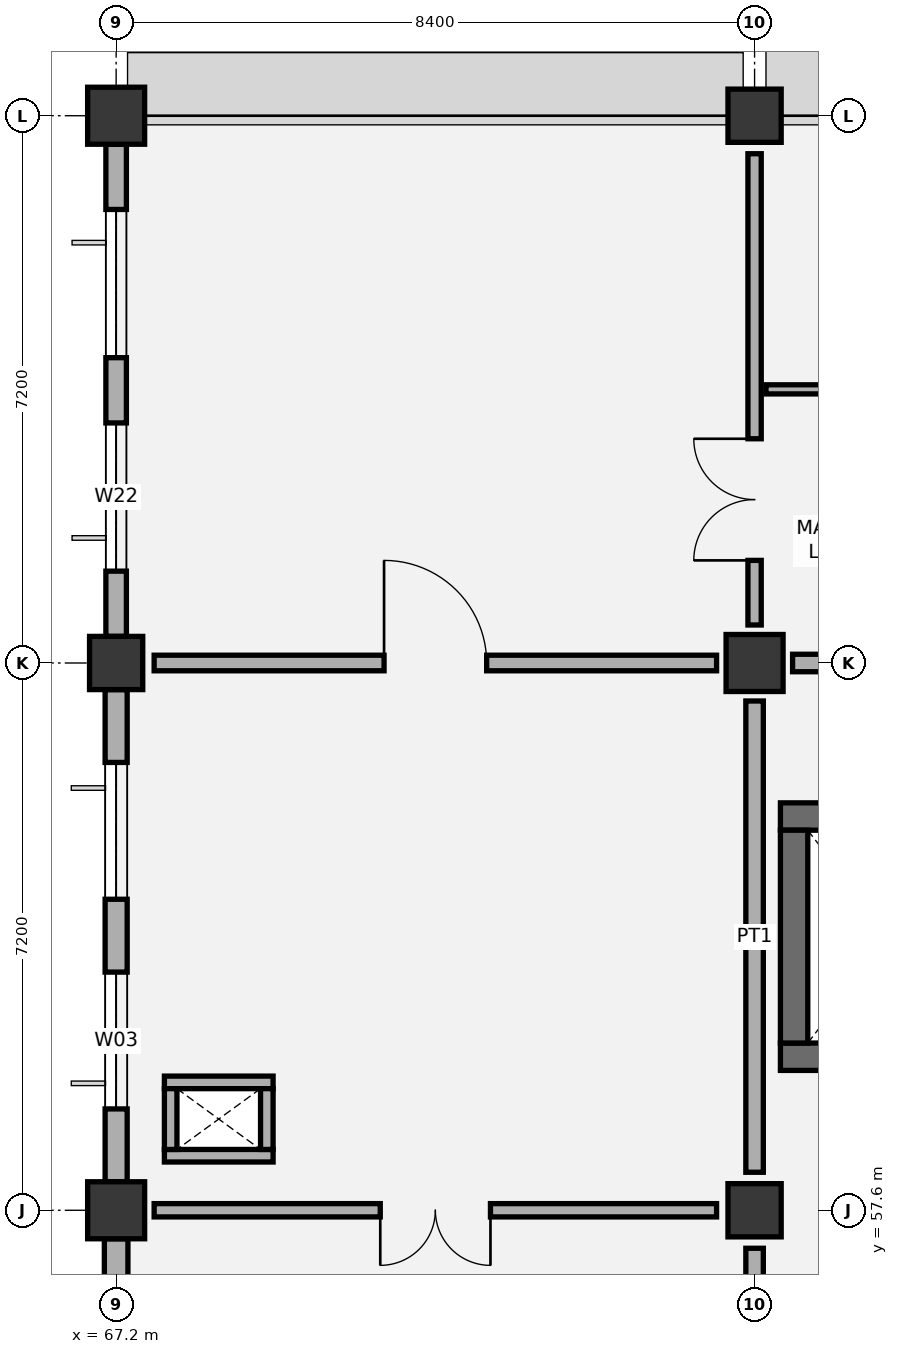
"""IFC4 building model, lengths in metres.
Left out: names, types, materials, properties, quantities, classifications, styles, units other than length and angle.
Written with IfcOpenShell. Run it as: python <this file> out.ifc"""

import sys

from ifc_helpers import new_model, si_unit, direction, frame, frame_2d, origin, origin_2d, place, context, subcontext, project, spatial, rectangle, extrude, element, fill, save


model = new_model("IFC4")
c1 = context("Model", 3, precision=1e-05, world=origin(), true_north=direction((0.0, 1.0)))
c2 = subcontext(c1, "Body", "Model", "MODEL_VIEW")
j1 = project(units=[si_unit("LENGTHUNIT", "METRE"), si_unit("PLANEANGLEUNIT", "RADIAN")], contexts=[c1])
p1 = place(None, origin())
s1 = spatial("IfcSite", under=j1, at=p1, CompositionType="ELEMENT")
p2 = place(p1, origin())
s2 = spatial("IfcBuilding", under=s1, at=p2, CompositionType="ELEMENT")
p3 = place(p2, frame((0.0, 0.0, 39.6)))
s3 = spatial("IfcBuildingStorey", under=s2, at=p3, CompositionType="ELEMENT", Elevation=39.6)
p4 = place(p3, frame((67.2, 57.6, 0.0), z_axis=(0.0, 0.0, 1.0), x_axis=(1.0, 0.0, 0.0)))
e1 = element("IfcColumn", 1, at=p4, inside=s3, PredefinedType="COLUMN", context=c2, shape_type="SweptSolid", body=[
    extrude(rectangle(XDim=0.75, YDim=0.75, at=origin_2d()), origin(), (0.0, 0.0, 1.0), 4.2),
])
p5 = place(p3, frame((67.2, 64.8, 0.0), z_axis=(0.0, 0.0, 1.0), x_axis=(1.0, 0.0, 0.0)))
e2 = element("IfcColumn", 2, at=p5, inside=s3, PredefinedType="COLUMN", context=c2, shape_type="SweptSolid", body=[
    extrude(rectangle(XDim=0.7, YDim=0.7, at=origin_2d()), origin(), (0.0, 0.0, 1.0), 4.2),
])
p6 = place(p3, frame((67.2, 72.0, 0.0), z_axis=(0.0, 0.0, 1.0), x_axis=(1.0, 0.0, 0.0)))
e3 = element("IfcColumn", 3, at=p6, inside=s3, PredefinedType="COLUMN", context=c2, shape_type="SweptSolid", body=[
    extrude(rectangle(XDim=0.75, YDim=0.75, at=origin_2d()), origin(), (0.0, 0.0, 1.0), 4.2),
])
p7 = place(p3, frame((75.6, 57.6, 0.0), z_axis=(0.0, 0.0, 1.0), x_axis=(1.0, 0.0, 0.0)))
e4 = element("IfcColumn", 4, at=p7, inside=s3, PredefinedType="COLUMN", context=c2, shape_type="SweptSolid", body=[
    extrude(rectangle(XDim=0.7, YDim=0.7, at=origin_2d()), origin(), (0.0, 0.0, 1.0), 4.2),
])
p8 = place(p3, frame((75.6, 64.8, 0.0), z_axis=(0.0, 0.0, 1.0), x_axis=(1.0, 0.0, 0.0)))
e5 = element("IfcColumn", 5, at=p8, inside=s3, PredefinedType="COLUMN", context=c2, shape_type="SweptSolid", body=[
    extrude(rectangle(XDim=0.75, YDim=0.75, at=origin_2d()), origin(), (0.0, 0.0, 1.0), 4.2),
])
p9 = place(p3, frame((75.6, 72.0, 0.0), z_axis=(0.0, 0.0, 1.0), x_axis=(1.0, 0.0, 0.0)))
e6 = element("IfcColumn", 6, at=p9, inside=s3, PredefinedType="COLUMN", context=c2, shape_type="SweptSolid", body=[
    extrude(rectangle(XDim=0.7, YDim=0.7, at=origin_2d()), origin(), (0.0, 0.0, 1.0), 4.2),
])
p10 = place(p3, frame((75.94, 62.78, 0.0), z_axis=(0.0, 0.0, 1.0), x_axis=(1.0, 0.0, 0.0)))
e7 = element("IfcWall", 7, at=p10, inside=s3, PredefinedType="SHEAR", context=c2, shape_type="SweptSolid", body=[
    extrude(rectangle(XDim=2.87, YDim=0.36, at=frame_2d((1.435, 0.0))), origin(), (0.0, 0.0, 1.0), 3.9),
])
p11 = place(p3, frame((75.94, 59.62, 0.0), z_axis=(0.0, 0.0, 1.0), x_axis=(1.0, 0.0, 0.0)))
e8 = element("IfcWall", 8, at=p11, inside=s3, PredefinedType="SHEAR", context=c2, shape_type="SweptSolid", body=[
    extrude(rectangle(XDim=2.87, YDim=0.36, at=frame_2d((1.435, 0.0))), origin(), (0.0, 0.0, 1.0), 3.9),
])
p12 = place(p11, frame((0.76, 0.0, 0.0)))
e9 = element("IfcOpeningElement", 9, at=p12, cuts=e8, PredefinedType="OPENING", context=c2, shape_type="SweptSolid", body=[
    extrude(rectangle(XDim=1.35, YDim=2.2, at=frame_2d((0.675, 1.1))), frame((0.0, 0.19, 0.0), z_axis=(0.0, -1.0, 0.0), x_axis=(1.0, 0.0, 0.0)), (0.0, 0.0, 1.0), 0.38),
])
p13 = place(p3, frame((76.12, 59.8, 0.0), z_axis=(0.0, 0.0, 1.0), x_axis=(0.0, 1.0, 0.0)))
e10 = element("IfcWall", 10, at=p13, inside=s3, PredefinedType="SHEAR", context=c2, shape_type="SweptSolid", body=[
    extrude(rectangle(XDim=2.8, YDim=0.36, at=frame_2d((1.4, 0.0))), origin(), (0.0, 0.0, 1.0), 3.9),
])
p14 = place(p3, frame((67.2, 50.75, 0.0), z_axis=(0.0, 0.0, 1.0), x_axis=(0.0, 1.0, 0.0)))
e11 = element("IfcWall", 11, at=p14, inside=s3, PredefinedType="SOLIDWALL", context=c2, shape_type="SweptSolid", body=[
    extrude(rectangle(XDim=6.475, YDim=0.31, at=frame_2d((3.238, 0.0))), origin(), (0.0, 0.0, 1.0), 3.295),
])
p15 = place(p14, frame((1.558, 0.0, 0.9)))
e12 = element("IfcOpeningElement", 12, at=p15, cuts=e11, PredefinedType="OPENING", context=c2, shape_type="SweptSolid", body=[
    extrude(rectangle(XDim=0.9, YDim=1.8, at=frame_2d((0.45, 0.9))), frame((0.0, 0.165, 0.0), z_axis=(0.0, -1.0, 0.0), x_axis=(1.0, 0.0, 0.0)), (0.0, 0.0, 1.0), 0.33),
])
p16 = place(p14, frame((4.017, 0.0, 0.9)))
e13 = element("IfcOpeningElement", 13, at=p16, cuts=e11, PredefinedType="OPENING", context=c2, shape_type="SweptSolid", body=[
    extrude(rectangle(XDim=0.9, YDim=1.8, at=frame_2d((0.45, 0.9))), frame((0.0, 0.165, 0.0), z_axis=(0.0, -1.0, 0.0), x_axis=(1.0, 0.0, 0.0)), (0.0, 0.0, 1.0), 0.33),
])
p17 = place(p3, frame((67.2, 57.975, 0.0), z_axis=(0.0, 0.0, 1.0), x_axis=(0.0, 1.0, 0.0)))
e14 = element("IfcWall", 14, at=p17, inside=s3, PredefinedType="SOLIDWALL", context=c2, shape_type="SweptSolid", body=[
    extrude(rectangle(XDim=6.475, YDim=0.29, at=frame_2d((3.237, 0.0))), origin(), (0.0, 0.0, 1.0), 3.295),
])
p18 = place(p17, frame((0.958, 0.0, 0.9)))
e15 = element("IfcOpeningElement", 15, at=p18, cuts=e14, PredefinedType="OPENING", context=c2, shape_type="SweptSolid", body=[
    extrude(rectangle(XDim=1.8, YDim=1.8, at=frame_2d((0.9, 0.9))), frame((0.0, 0.155, 0.0), z_axis=(0.0, -1.0, 0.0), x_axis=(1.0, 0.0, 0.0)), (0.0, 0.0, 1.0), 0.31),
])
p19 = place(p17, frame((3.717, 0.0, 0.9)))
e16 = element("IfcOpeningElement", 16, at=p19, cuts=e14, PredefinedType="OPENING", context=c2, shape_type="SweptSolid", body=[
    extrude(rectangle(XDim=1.8, YDim=1.8, at=frame_2d((0.9, 0.9))), frame((0.0, 0.155, 0.0), z_axis=(0.0, -1.0, 0.0), x_axis=(1.0, 0.0, 0.0)), (0.0, 0.0, 1.0), 0.31),
])
p20 = place(p3, frame((67.2, 65.15, 0.0), z_axis=(0.0, 0.0, 1.0), x_axis=(0.0, 1.0, 0.0)))
e17 = element("IfcWall", 17, at=p20, inside=s3, PredefinedType="SOLIDWALL", context=c2, shape_type="SweptSolid", body=[
    extrude(rectangle(XDim=6.475, YDim=0.27, at=frame_2d((3.238, 0.0))), origin(), (0.0, 0.0, 1.0), 3.295),
])
p21 = place(p20, frame((0.858, 0.0, 0.9)))
e18 = element("IfcOpeningElement", 18, at=p21, cuts=e17, PredefinedType="OPENING", context=c2, shape_type="SweptSolid", body=[
    extrude(rectangle(XDim=1.95, YDim=1.95, at=frame_2d((0.975, 0.975))), frame((0.0, 0.145, 0.0), z_axis=(0.0, -1.0, 0.0), x_axis=(1.0, 0.0, 0.0)), (0.0, 0.0, 1.0), 0.29),
])
p22 = place(p20, frame((3.667, 0.0, 0.9)))
e19 = element("IfcOpeningElement", 19, at=p22, cuts=e17, PredefinedType="OPENING", context=c2, shape_type="SweptSolid", body=[
    extrude(rectangle(XDim=1.95, YDim=1.95, at=frame_2d((0.975, 0.975))), frame((0.0, 0.145, 0.0), z_axis=(0.0, -1.0, 0.0), x_axis=(1.0, 0.0, 0.0)), (0.0, 0.0, 1.0), 0.29),
])
for number, where, z_axis, x_axis in (
    (20, (67.835, 58.317, 0.0), (0.0, 0.0, 1.0), (1.0, 0.0, 0.0)),
    (21, (67.835, 59.282, 0.0), (0.0, 0.0, 1.0), (1.0, 0.0, 0.0)),
):
    element("IfcWall", number, at=place(p3, frame(where, z_axis=z_axis, x_axis=x_axis)), inside=s3, PredefinedType="PARTITIONING", context=c2, shape_type="SweptSolid", body=[
        extrude(rectangle(XDim=1.43, YDim=0.165, at=frame_2d((0.715, 0.0))), origin(), (0.0, 0.0, 1.0), 3.85),
    ])
for number, where, z_axis, x_axis in (
    (22, (67.917, 58.4, 0.0), (0.0, 0.0, 1.0), (0.0, 1.0, 0.0)),
    (23, (69.183, 58.4, 0.0), (0.0, 0.0, 1.0), (0.0, 1.0, 0.0)),
):
    element("IfcWall", number, at=place(p3, frame(where, z_axis=z_axis, x_axis=x_axis)), inside=s3, PredefinedType="PARTITIONING", context=c2, shape_type="SweptSolid", body=[
        extrude(rectangle(XDim=0.8, YDim=0.165, at=frame_2d((0.4, 0.0))), origin(), (0.0, 0.0, 1.0), 3.85),
    ])
p23 = place(p3, frame((75.75, 68.4, 0.0), z_axis=(0.0, 0.0, 1.0), x_axis=(1.0, 0.0, 0.0)))
e24 = element("IfcWall", 24, at=p23, inside=s3, PredefinedType="PARTITIONING", context=c2, shape_type="SweptSolid", body=[
    extrude(rectangle(XDim=8.1, YDim=0.12, at=frame_2d((4.05, 0.0))), origin(), (0.0, 0.0, 1.0), 3.9),
])
p24 = place(p23, frame((3.55, 0.0, 0.0)))
e25 = element("IfcOpeningElement", 25, at=p24, cuts=e24, PredefinedType="OPENING", context=c2, shape_type="SweptSolid", body=[
    extrude(rectangle(XDim=1.6, YDim=2.2, at=frame_2d((0.8, 1.1))), frame((0.0, 0.07, 0.0), z_axis=(0.0, -1.0, 0.0), x_axis=(1.0, 0.0, 0.0)), (0.0, 0.0, 1.0), 0.14),
])
p25 = place(p3, frame((75.6, 50.9, 0.0), z_axis=(0.0, 0.0, 1.0), x_axis=(0.0, 1.0, 0.0)))
e26 = element("IfcWall", 26, at=p25, inside=s3, PredefinedType="PARTITIONING", context=c2, shape_type="SweptSolid", body=[
    extrude(rectangle(XDim=6.2, YDim=0.23, at=frame_2d((3.1, 0.0))), origin(), (0.0, 0.0, 1.0), 3.445),
])
p26 = place(p25, frame((0.05, 0.0, 0.0)))
e27 = element("IfcOpeningElement", 27, at=p26, cuts=e26, PredefinedType="OPENING", context=c2, shape_type="SweptSolid", body=[
    extrude(rectangle(XDim=1.05, YDim=2.15, at=frame_2d((0.525, 1.075))), frame((0.0, 0.125, 0.0), z_axis=(0.0, -1.0, 0.0), x_axis=(1.0, 0.0, 0.0)), (0.0, 0.0, 1.0), 0.25),
])
p27 = place(p3, frame((67.7, 57.6, 0.0), z_axis=(0.0, 0.0, 1.0), x_axis=(1.0, 0.0, 0.0)))
e28 = element("IfcWall", 28, at=p27, inside=s3, PredefinedType="PARTITIONING", context=c2, shape_type="SweptSolid", body=[
    extrude(rectangle(XDim=7.4, YDim=0.175, at=frame_2d((3.7, 0.0))), origin(), (0.0, 0.0, 1.0), 3.245),
])
p28 = place(p27, frame((2.975, 0.0, 0.0)))
e29 = element("IfcOpeningElement", 29, at=p28, cuts=e28, PredefinedType="OPENING", context=c2, shape_type="SweptSolid", body=[
    extrude(rectangle(XDim=1.45, YDim=2.2, at=frame_2d((0.725, 1.1))), frame((0.0, 0.097, 0.0), z_axis=(0.0, -1.0, 0.0), x_axis=(1.0, 0.0, 0.0)), (0.0, 0.0, 1.0), 0.195),
])
p29 = place(p3, frame((75.6, 58.1, 0.0), z_axis=(0.0, 0.0, 1.0), x_axis=(0.0, 1.0, 0.0)))
e30 = element("IfcWall", 30, at=p29, inside=s3, PredefinedType="PARTITIONING", context=c2, shape_type="SweptSolid", body=[
    extrude(rectangle(XDim=6.2, YDim=0.23, at=frame_2d((3.1, 0.0))), origin(), (0.0, 0.0, 1.0), 3.295),
])
p30 = place(p3, frame((67.7, 64.8, 0.0), z_axis=(0.0, 0.0, 1.0), x_axis=(1.0, 0.0, 0.0)))
e31 = element("IfcWall", 31, at=p30, inside=s3, PredefinedType="PARTITIONING", context=c2, shape_type="SweptSolid", body=[
    extrude(rectangle(XDim=7.4, YDim=0.205, at=frame_2d((3.7, 0.0))), origin(), (0.0, 0.0, 1.0), 3.245),
])
p31 = place(p30, frame((3.025, 0.0, 0.0)))
e32 = element("IfcOpeningElement", 32, at=p31, cuts=e31, PredefinedType="OPENING", context=c2, shape_type="SweptSolid", body=[
    extrude(rectangle(XDim=1.35, YDim=2.15, at=frame_2d((0.675, 1.075))), frame((0.0, 0.113, 0.0), z_axis=(0.0, -1.0, 0.0), x_axis=(1.0, 0.0, 0.0)), (0.0, 0.0, 1.0), 0.225),
])
p32 = place(p3, frame((75.6, 65.3, 0.0), z_axis=(0.0, 0.0, 1.0), x_axis=(0.0, 1.0, 0.0)))
e33 = element("IfcWall", 33, at=p32, inside=s3, PredefinedType="PARTITIONING", context=c2, shape_type="SweptSolid", body=[
    extrude(rectangle(XDim=6.2, YDim=0.175, at=frame_2d((3.1, 0.0))), origin(), (0.0, 0.0, 1.0), 3.555),
])
p33 = place(p32, frame((0.85, 0.0, 0.0)))
e34 = element("IfcOpeningElement", 34, at=p33, cuts=e33, PredefinedType="OPENING", context=c2, shape_type="SweptSolid", body=[
    extrude(rectangle(XDim=1.6, YDim=2.2, at=frame_2d((0.8, 1.1))), frame((0.0, 0.097, 0.0), z_axis=(0.0, -1.0, 0.0), x_axis=(1.0, 0.0, 0.0)), (0.0, 0.0, 1.0), 0.195),
])
p34 = place(p3, frame((76.1, 64.8, 0.0), z_axis=(0.0, 0.0, 1.0), x_axis=(1.0, 0.0, 0.0)))
e35 = element("IfcWall", 35, at=p34, inside=s3, PredefinedType="PARTITIONING", context=c2, shape_type="SweptSolid", body=[
    extrude(rectangle(XDim=7.4, YDim=0.23, at=frame_2d((3.7, 0.0))), origin(), (0.0, 0.0, 1.0), 3.295),
])
p35 = place(p18, origin())
e36 = element("IfcWindow", 36, at=p35, inside=s3, PartitioningType="SINGLE_PANEL", PredefinedType="WINDOW", context=c2, shape_type="SweptSolid", body=[
    extrude(rectangle(XDim=1.8, YDim=1.8, at=frame_2d((0.9, 0.9))), frame((0.0, 0.03, 0.0), z_axis=(0.0, -1.0, 0.0), x_axis=(1.0, 0.0, 0.0)), (0.0, 0.0, 1.0), 0.06),
])
fill(e15, e36)
p36 = place(p19, origin())
e37 = element("IfcWindow", 37, at=p36, inside=s3, PartitioningType="SINGLE_PANEL", PredefinedType="WINDOW", context=c2, shape_type="SweptSolid", body=[
    extrude(rectangle(XDim=1.8, YDim=1.8, at=frame_2d((0.9, 0.9))), frame((0.0, 0.03, 0.0), z_axis=(0.0, -1.0, 0.0), x_axis=(1.0, 0.0, 0.0)), (0.0, 0.0, 1.0), 0.06),
])
fill(e16, e37)
p37 = place(p21, origin())
e38 = element("IfcWindow", 38, at=p37, inside=s3, PartitioningType="SINGLE_PANEL", PredefinedType="WINDOW", context=c2, shape_type="SweptSolid", body=[
    extrude(rectangle(XDim=1.95, YDim=1.95, at=frame_2d((0.975, 0.975))), frame((0.0, 0.03, 0.0), z_axis=(0.0, -1.0, 0.0), x_axis=(1.0, 0.0, 0.0)), (0.0, 0.0, 1.0), 0.06),
])
fill(e18, e38)
p38 = place(p22, origin())
e39 = element("IfcWindow", 39, at=p38, inside=s3, PartitioningType="SINGLE_PANEL", PredefinedType="WINDOW", context=c2, shape_type="SweptSolid", body=[
    extrude(rectangle(XDim=1.95, YDim=1.95, at=frame_2d((0.975, 0.975))), frame((0.0, 0.03, 0.0), z_axis=(0.0, -1.0, 0.0), x_axis=(1.0, 0.0, 0.0)), (0.0, 0.0, 1.0), 0.06),
])
fill(e19, e39)
p39 = place(p28, frame((1.45, 0.0, 0.0), z_axis=(0.0, 0.0, 1.0), x_axis=(-1.0, 0.0, 0.0)))
e40 = element("IfcDoor", 40, at=p39, inside=s3, OperationType="DOUBLE_DOOR_SINGLE_SWING", PredefinedType="DOOR", context=c2, shape_type="SweptSolid", body=[
    extrude(rectangle(XDim=1.45, YDim=2.2, at=frame_2d((0.725, 1.1))), frame((0.0, 0.025, 0.0), z_axis=(0.0, -1.0, 0.0), x_axis=(1.0, 0.0, 0.0)), (0.0, 0.0, 1.0), 0.05),
])
fill(e29, e40)
p40 = place(p31, origin())
e41 = element("IfcDoor", 41, at=p40, inside=s3, OperationType="SINGLE_SWING_LEFT", PredefinedType="DOOR", context=c2, shape_type="SweptSolid", body=[
    extrude(rectangle(XDim=1.35, YDim=2.15, at=frame_2d((0.675, 1.075))), frame((0.0, 0.025, 0.0), z_axis=(0.0, -1.0, 0.0), x_axis=(1.0, 0.0, 0.0)), (0.0, 0.0, 1.0), 0.05),
])
fill(e32, e41)
p41 = place(p33, origin())
e42 = element("IfcDoor", 42, at=p41, inside=s3, OperationType="DOUBLE_DOOR_SINGLE_SWING", PredefinedType="DOOR", context=c2, shape_type="SweptSolid", body=[
    extrude(rectangle(XDim=1.6, YDim=2.2, at=frame_2d((0.8, 1.1))), frame((0.0, 0.025, 0.0), z_axis=(0.0, -1.0, 0.0), x_axis=(1.0, 0.0, 0.0)), (0.0, 0.0, 1.0), 0.05),
])
fill(e34, e42)
save(model, sys.argv[1])
